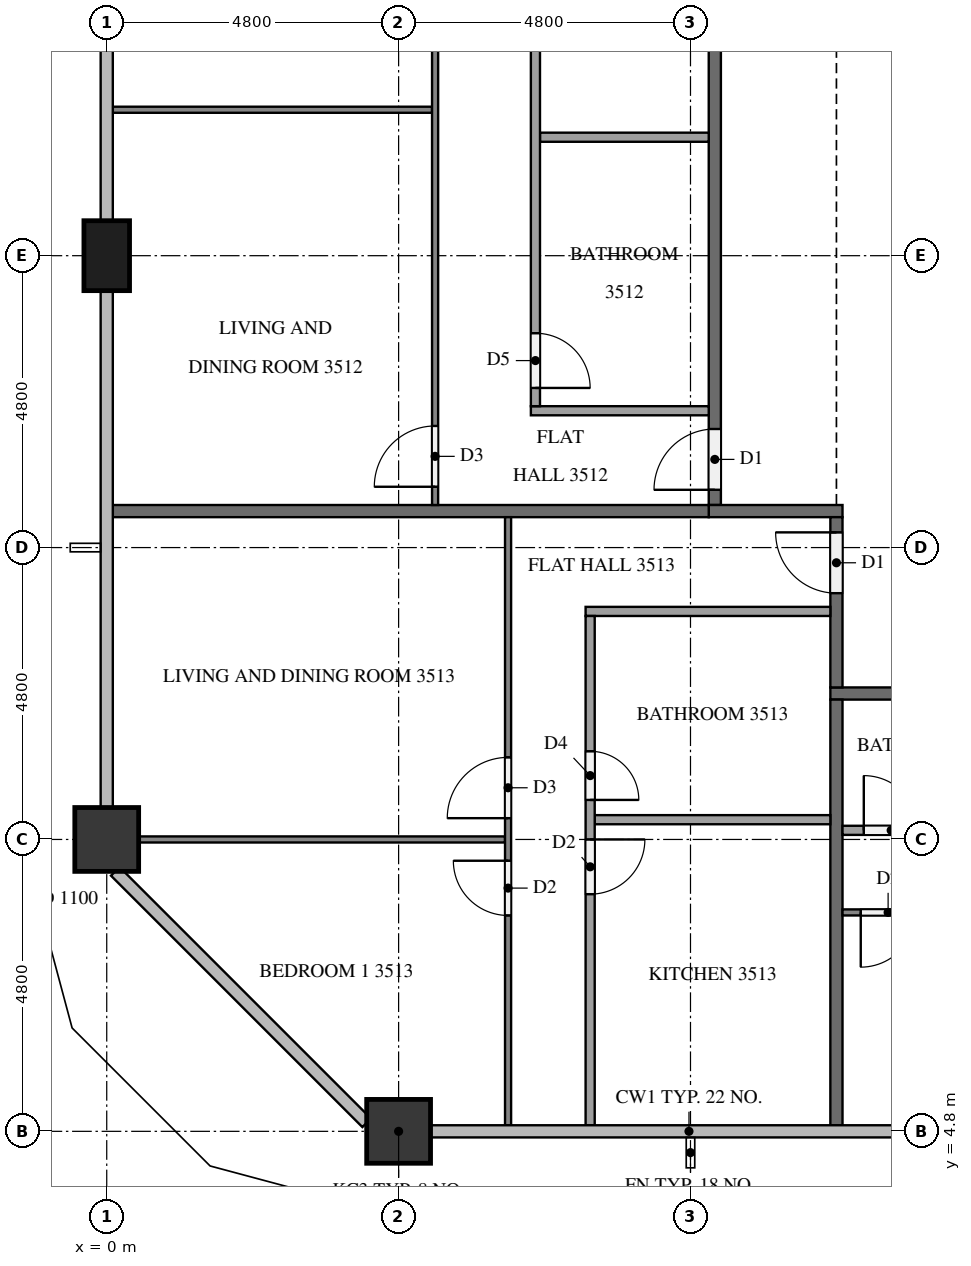
"""IFC4 building model, lengths in metres.
Left out: names, types, materials, properties, quantities, classifications, styles, units other than length and angle.
Written with IfcOpenShell. Run it as: python <this file> out.ifc"""

import sys

from ifc_helpers import new_model, si_unit, direction, frame, frame_2d, origin, origin_2d, place, context, subcontext, project, spatial, rectangle, extrude, element, fill, save


model = new_model("IFC4")
c1 = context("Model", 3, precision=1e-05, world=origin(), true_north=direction((0.0, 1.0)))
c2 = subcontext(c1, "Body", "Model", "MODEL_VIEW")
j1 = project(units=[si_unit("LENGTHUNIT", "METRE"), si_unit("PLANEANGLEUNIT", "RADIAN")], contexts=[c1])
p1 = place(None, origin())
s1 = spatial("IfcSite", under=j1, at=p1, CompositionType="ELEMENT")
p2 = place(p1, origin())
s2 = spatial("IfcBuilding", under=s1, at=p2, CompositionType="ELEMENT")
p3 = place(p2, frame((0.0, 0.0, 136.6)))
s3 = spatial("IfcBuildingStorey", under=s2, at=p3, CompositionType="ELEMENT", Elevation=136.6)
p4 = place(p3, frame((4.8, 4.8, 0.0), z_axis=(0.0, 0.0, 1.0), x_axis=(1.0, 0.0, 0.0)))
e1 = element("IfcColumn", 1, at=p4, inside=s3, PredefinedType="COLUMN", context=c2, shape_type="SweptSolid", body=[
    extrude(rectangle(XDim=1.05, YDim=1.05, at=origin_2d()), origin(), (0.0, 0.0, 1.0), 3.2),
])
p5 = place(p3, frame((0.0, 19.2, 0.0), z_axis=(0.0, 0.0, 1.0), x_axis=(0.0, 1.0, 0.0)))
e2 = element("IfcColumn", 2, at=p5, inside=s3, PredefinedType="COLUMN", context=c2, shape_type="SweptSolid", body=[
    extrude(rectangle(XDim=1.15, YDim=0.75, at=origin_2d()), origin(), (0.0, 0.0, 1.0), 3.2),
])
p6 = place(p3, frame((0.0, 9.6, 0.0), z_axis=(0.0, 0.0, 1.0), x_axis=(1.0, 0.0, 0.0)))
e3 = element("IfcColumn", 3, at=p6, inside=s3, PredefinedType="COLUMN", context=c2, shape_type="SweptSolid", body=[
    extrude(rectangle(XDim=1.05, YDim=1.05, at=origin_2d()), origin(), (0.0, 0.0, 1.0), 3.2),
])
p7 = place(p3, frame((50.5, 12.0, 0.0), z_axis=(0.0, 0.0, 1.0), x_axis=(-1.0, 0.0, 0.0)))
e4 = element("IfcWall", 4, at=p7, inside=s3, PredefinedType="PARTITIONING", context=c2, shape_type="SweptSolid", body=[
    extrude(rectangle(XDim=38.6, YDim=0.2, at=frame_2d((19.3, 0.0))), origin(), (0.0, 0.0, 1.0), 3.2),
])
p8 = place(p7, frame((24.45, 0.0, 0.0)))
e5 = element("IfcOpeningElement", 5, at=p8, cuts=e4, PredefinedType="OPENING", context=c2, shape_type="SweptSolid", body=[
    extrude(rectangle(XDim=1.0, YDim=2.1, at=frame_2d((0.5, 1.05))), frame((0.0, 0.11, 0.0), z_axis=(0.0, -1.0, 0.0), x_axis=(1.0, 0.0, 0.0)), (0.0, 0.0, 1.0), 0.22),
])
p9 = place(p7, frame((10.05, 0.0, 0.0)))
e6 = element("IfcOpeningElement", 6, at=p9, cuts=e4, PredefinedType="OPENING", context=c2, shape_type="SweptSolid", body=[
    extrude(rectangle(XDim=1.0, YDim=2.1, at=frame_2d((0.5, 1.05))), frame((0.0, 0.11, 0.0), z_axis=(0.0, -1.0, 0.0), x_axis=(1.0, 0.0, 0.0)), (0.0, 0.0, 1.0), 0.22),
])
p10 = place(p7, frame((8.35, 0.0, 0.0)))
e7 = element("IfcOpeningElement", 7, at=p10, cuts=e4, PredefinedType="OPENING", context=c2, shape_type="SweptSolid", body=[
    extrude(rectangle(XDim=1.0, YDim=2.1, at=frame_2d((0.5, 1.05))), frame((0.0, 0.11, 0.0), z_axis=(0.0, -1.0, 0.0), x_axis=(1.0, 0.0, 0.0)), (0.0, 0.0, 1.0), 0.22),
])
p11 = place(p3, frame((10.0, 15.1, 0.0), z_axis=(0.0, 0.0, 1.0), x_axis=(0.0, 1.0, 0.0)))
e8 = element("IfcWall", 8, at=p11, inside=s3, PredefinedType="PARTITIONING", context=c2, shape_type="SweptSolid", body=[
    extrude(rectangle(XDim=22.6, YDim=0.2, at=frame_2d((11.3, 0.0))), origin(), (0.0, 0.0, 1.0), 3.2),
])
p12 = place(p11, frame((16.45, 0.0, 0.0)))
e9 = element("IfcOpeningElement", 9, at=p12, cuts=e8, PredefinedType="OPENING", context=c2, shape_type="SweptSolid", body=[
    extrude(rectangle(XDim=1.0, YDim=2.1, at=frame_2d((0.5, 1.05))), frame((0.0, 0.11, 0.0), z_axis=(0.0, -1.0, 0.0), x_axis=(1.0, 0.0, 0.0)), (0.0, 0.0, 1.0), 0.22),
])
p13 = place(p11, frame((0.25, 0.0, 0.0)))
e10 = element("IfcOpeningElement", 10, at=p13, cuts=e8, PredefinedType="OPENING", context=c2, shape_type="SweptSolid", body=[
    extrude(rectangle(XDim=1.0, YDim=2.1, at=frame_2d((0.5, 1.05))), frame((0.0, 0.11, 0.0), z_axis=(0.0, -1.0, 0.0), x_axis=(1.0, 0.0, 0.0)), (0.0, 0.0, 1.0), 0.22),
])
p14 = place(p3, frame((9.9, 15.0, 0.0), z_axis=(0.0, 0.0, 1.0), x_axis=(1.0, 0.0, 0.0)))
e11 = element("IfcWall", 11, at=p14, inside=s3, PredefinedType="PARTITIONING", context=c2, shape_type="SweptSolid", body=[
    extrude(rectangle(XDim=2.2, YDim=0.2, at=frame_2d((1.1, 0.0))), origin(), (0.0, 0.0, 1.0), 3.2),
])
p15 = place(p3, frame((12.0, 12.1, 0.0), z_axis=(0.0, 0.0, 1.0), x_axis=(0.0, 1.0, 0.0)))
e12 = element("IfcWall", 12, at=p15, inside=s3, PredefinedType="PARTITIONING", context=c2, shape_type="SweptSolid", body=[
    extrude(rectangle(XDim=2.8, YDim=0.2, at=frame_2d((1.4, 0.0))), origin(), (0.0, 0.0, 1.0), 3.2),
])
p16 = place(p15, frame((1.55, 0.0, 0.0)))
e13 = element("IfcOpeningElement", 13, at=p16, cuts=e12, PredefinedType="OPENING", context=c2, shape_type="SweptSolid", body=[
    extrude(rectangle(XDim=1.0, YDim=2.1, at=frame_2d((0.5, 1.05))), frame((0.0, 0.11, 0.0), z_axis=(0.0, -1.0, 0.0), x_axis=(1.0, 0.0, 0.0)), (0.0, 0.0, 1.0), 0.22),
])
p17 = place(p3, frame((12.0, 4.9, 0.0), z_axis=(0.0, 0.0, 1.0), x_axis=(0.0, 1.0, 0.0)))
e14 = element("IfcWall", 14, at=p17, inside=s3, PredefinedType="PARTITIONING", context=c2, shape_type="SweptSolid", body=[
    extrude(rectangle(XDim=7.0, YDim=0.2, at=frame_2d((3.5, 0.0))), origin(), (0.0, 0.0, 1.0), 3.2),
])
p18 = place(p3, frame((0.1, 15.0, 0.0), z_axis=(0.0, 0.0, 1.0), x_axis=(1.0, 0.0, 0.0)))
e15 = element("IfcWall", 15, at=p18, inside=s3, PredefinedType="PARTITIONING", context=c2, shape_type="SweptSolid", body=[
    extrude(rectangle(XDim=9.8, YDim=0.2, at=frame_2d((4.9, 0.0))), origin(), (0.0, 0.0, 1.0), 3.2),
])
p19 = place(p3, frame((26.3, 8.4, 0.0), z_axis=(0.0, 0.0, 1.0), x_axis=(-1.0, 0.0, 0.0)))
e16 = element("IfcWall", 16, at=p19, inside=s3, PredefinedType="PARTITIONING", context=c2, shape_type="SweptSolid", body=[
    extrude(rectangle(XDim=14.2, YDim=0.1, at=frame_2d((7.1, 0.0))), origin(), (0.0, 0.0, 1.0), 3.2),
])
p20 = place(p19, frame((3.45, 0.0, 0.0)))
e17 = element("IfcOpeningElement", 17, at=p20, cuts=e16, PredefinedType="OPENING", context=c2, shape_type="SweptSolid", body=[
    extrude(rectangle(XDim=0.9, YDim=2.1, at=frame_2d((0.45, 1.05))), frame((0.0, 0.06, 0.0), z_axis=(0.0, -1.0, 0.0), x_axis=(1.0, 0.0, 0.0)), (0.0, 0.0, 1.0), 0.12),
])
p21 = place(p19, frame((5.05, 0.0, 0.0)))
e18 = element("IfcOpeningElement", 18, at=p21, cuts=e16, PredefinedType="OPENING", context=c2, shape_type="SweptSolid", body=[
    extrude(rectangle(XDim=1.0, YDim=2.1, at=frame_2d((0.5, 1.05))), frame((0.0, 0.06, 0.0), z_axis=(0.0, -1.0, 0.0), x_axis=(1.0, 0.0, 0.0)), (0.0, 0.0, 1.0), 0.12),
])
p22 = place(p19, frame((13.0, 0.0, 0.0)))
e19 = element("IfcOpeningElement", 19, at=p22, cuts=e16, PredefinedType="OPENING", context=c2, shape_type="SweptSolid", body=[
    extrude(rectangle(XDim=0.9, YDim=2.1, at=frame_2d((0.45, 1.05))), frame((0.0, 0.06, 0.0), z_axis=(0.0, -1.0, 0.0), x_axis=(1.0, 0.0, 0.0)), (0.0, 0.0, 1.0), 0.12),
])
p23 = place(p3, frame((12.1, 9.75, 0.0), z_axis=(0.0, 0.0, 1.0), x_axis=(1.0, 0.0, 0.0)))
e20 = element("IfcWall", 20, at=p23, inside=s3, PredefinedType="PARTITIONING", context=c2, shape_type="SweptSolid", body=[
    extrude(rectangle(XDim=12.575, YDim=0.15, at=frame_2d((6.288, 0.0))), origin(), (0.0, 0.0, 1.0), 3.2),
])
p24 = place(p23, frame((9.998, 0.0, 0.0)))
e21 = element("IfcOpeningElement", 21, at=p24, cuts=e20, PredefinedType="OPENING", context=c2, shape_type="SweptSolid", body=[
    extrude(rectangle(XDim=0.8, YDim=2.1, at=frame_2d((0.4, 1.05))), frame((0.0, 0.085, 0.0), z_axis=(0.0, -1.0, 0.0), x_axis=(1.0, 0.0, 0.0)), (0.0, 0.0, 1.0), 0.17),
])
p25 = place(p23, frame((8.448, 0.0, 0.0)))
e22 = element("IfcOpeningElement", 22, at=p25, cuts=e20, PredefinedType="OPENING", context=c2, shape_type="SweptSolid", body=[
    extrude(rectangle(XDim=0.9, YDim=2.1, at=frame_2d((0.45, 1.05))), frame((0.0, 0.085, 0.0), z_axis=(0.0, -1.0, 0.0), x_axis=(1.0, 0.0, 0.0)), (0.0, 0.0, 1.0), 0.17),
])
p26 = place(p23, frame((0.35, 0.0, 0.0)))
e23 = element("IfcOpeningElement", 23, at=p26, cuts=e20, PredefinedType="OPENING", context=c2, shape_type="SweptSolid", body=[
    extrude(rectangle(XDim=0.9, YDim=2.1, at=frame_2d((0.45, 1.05))), frame((0.0, 0.085, 0.0), z_axis=(0.0, -1.0, 0.0), x_axis=(1.0, 0.0, 0.0)), (0.0, 0.0, 1.0), 0.17),
])
p27 = place(p3, frame((5.35, 21.6, 0.0), z_axis=(0.0, 0.0, 1.0), x_axis=(-1.0, 0.0, 0.0)))
e24 = element("IfcWall", 24, at=p27, inside=s3, PredefinedType="PARTITIONING", context=c2, shape_type="SweptSolid", body=[
    extrude(rectangle(XDim=5.25, YDim=0.1, at=frame_2d((2.625, 0.0))), origin(), (0.0, 0.0, 1.0), 3.2),
])
p28 = place(p3, frame((5.4, 15.1, 0.0), z_axis=(0.0, 0.0, 1.0), x_axis=(0.0, 1.0, 0.0)))
e25 = element("IfcWall", 25, at=p28, inside=s3, PredefinedType="PARTITIONING", context=c2, shape_type="SweptSolid", body=[
    extrude(rectangle(XDim=16.0, YDim=0.1, at=frame_2d((8.0, 0.0))), origin(), (0.0, 0.0, 1.0), 3.2),
])
p29 = place(p28, frame((0.3, 0.0, 0.0)))
e26 = element("IfcOpeningElement", 26, at=p29, cuts=e25, PredefinedType="OPENING", context=c2, shape_type="SweptSolid", body=[
    extrude(rectangle(XDim=1.0, YDim=2.1, at=frame_2d((0.5, 1.05))), frame((0.0, 0.06, 0.0), z_axis=(0.0, -1.0, 0.0), x_axis=(1.0, 0.0, 0.0)), (0.0, 0.0, 1.0), 0.12),
])
p30 = place(p28, frame((10.05, 0.0, 0.0)))
e27 = element("IfcOpeningElement", 27, at=p30, cuts=e25, PredefinedType="OPENING", context=c2, shape_type="SweptSolid", body=[
    extrude(rectangle(XDim=0.9, YDim=2.1, at=frame_2d((0.45, 1.05))), frame((0.0, 0.06, 0.0), z_axis=(0.0, -1.0, 0.0), x_axis=(1.0, 0.0, 0.0)), (0.0, 0.0, 1.0), 0.12),
])
p31 = place(p28, frame((11.65, 0.0, 0.0)))
e28 = element("IfcOpeningElement", 28, at=p31, cuts=e25, PredefinedType="OPENING", context=c2, shape_type="SweptSolid", body=[
    extrude(rectangle(XDim=0.9, YDim=2.1, at=frame_2d((0.45, 1.05))), frame((0.0, 0.06, 0.0), z_axis=(0.0, -1.0, 0.0), x_axis=(1.0, 0.0, 0.0)), (0.0, 0.0, 1.0), 0.12),
])
p32 = place(p3, frame((9.9, 21.148, 0.0), z_axis=(0.0, 0.0, 1.0), x_axis=(-1.0, 0.0, 0.0)))
e29 = element("IfcWall", 29, at=p32, inside=s3, PredefinedType="PARTITIONING", context=c2, shape_type="SweptSolid", body=[
    extrude(rectangle(XDim=2.775, YDim=0.15, at=frame_2d((1.387, 0.0))), origin(), (0.0, 0.0, 1.0), 3.2),
])
p33 = place(p3, frame((9.9, 16.65, 0.0), z_axis=(0.0, 0.0, 1.0), x_axis=(-1.0, 0.0, 0.0)))
e30 = element("IfcWall", 30, at=p33, inside=s3, PredefinedType="PARTITIONING", context=c2, shape_type="SweptSolid", body=[
    extrude(rectangle(XDim=2.925, YDim=0.15, at=frame_2d((1.462, 0.0))), origin(), (0.0, 0.0, 1.0), 3.2),
])
p34 = place(p3, frame((7.05, 31.1, 0.0), z_axis=(0.0, 0.0, 1.0), x_axis=(0.0, -1.0, 0.0)))
e31 = element("IfcWall", 31, at=p34, inside=s3, PredefinedType="PARTITIONING", context=c2, shape_type="SweptSolid", body=[
    extrude(rectangle(XDim=14.375, YDim=0.15, at=frame_2d((7.188, 0.0))), origin(), (0.0, 0.0, 1.0), 3.2),
])
p35 = place(p34, frame((13.175, 0.0, 0.0)))
e32 = element("IfcOpeningElement", 32, at=p35, cuts=e31, PredefinedType="OPENING", context=c2, shape_type="SweptSolid", body=[
    extrude(rectangle(XDim=0.9, YDim=2.1, at=frame_2d((0.45, 1.05))), frame((0.0, 0.085, 0.0), z_axis=(0.0, -1.0, 0.0), x_axis=(1.0, 0.0, 0.0)), (0.0, 0.0, 1.0), 0.17),
])
p36 = place(p34, frame((3.642, 0.0, 0.0)))
e33 = element("IfcOpeningElement", 33, at=p36, cuts=e31, PredefinedType="OPENING", context=c2, shape_type="SweptSolid", body=[
    extrude(rectangle(XDim=0.9, YDim=2.1, at=frame_2d((0.45, 1.05))), frame((0.0, 0.085, 0.0), z_axis=(0.0, -1.0, 0.0), x_axis=(1.0, 0.0, 0.0)), (0.0, 0.0, 1.0), 0.17),
])
p37 = place(p34, frame((2.192, 0.0, 0.0)))
e34 = element("IfcOpeningElement", 34, at=p37, cuts=e31, PredefinedType="OPENING", context=c2, shape_type="SweptSolid", body=[
    extrude(rectangle(XDim=0.8, YDim=2.1, at=frame_2d((0.4, 1.05))), frame((0.0, 0.085, 0.0), z_axis=(0.0, -1.0, 0.0), x_axis=(1.0, 0.0, 0.0)), (0.0, 0.0, 1.0), 0.17),
])
p38 = place(p3, frame((6.55, 9.6, 0.0), z_axis=(0.0, 0.0, 1.0), x_axis=(-1.0, 0.0, 0.0)))
e35 = element("IfcWall", 35, at=p38, inside=s3, PredefinedType="PARTITIONING", context=c2, shape_type="SweptSolid", body=[
    extrude(rectangle(XDim=6.025, YDim=0.1, at=frame_2d((3.013, 0.0))), origin(), (0.0, 0.0, 1.0), 3.2),
])
p39 = place(p3, frame((6.6, 4.9, 0.0), z_axis=(0.0, 0.0, 1.0), x_axis=(0.0, 1.0, 0.0)))
e36 = element("IfcWall", 36, at=p39, inside=s3, PredefinedType="PARTITIONING", context=c2, shape_type="SweptSolid", body=[
    extrude(rectangle(XDim=10.0, YDim=0.1, at=frame_2d((5.0, 0.0))), origin(), (0.0, 0.0, 1.0), 3.2),
])
p40 = place(p39, frame((5.05, 0.0, 0.0)))
e37 = element("IfcOpeningElement", 37, at=p40, cuts=e36, PredefinedType="OPENING", context=c2, shape_type="SweptSolid", body=[
    extrude(rectangle(XDim=1.0, YDim=2.1, at=frame_2d((0.5, 1.05))), frame((0.0, 0.06, 0.0), z_axis=(0.0, -1.0, 0.0), x_axis=(1.0, 0.0, 0.0)), (0.0, 0.0, 1.0), 0.12),
])
p41 = place(p39, frame((3.45, 0.0, 0.0)))
e38 = element("IfcOpeningElement", 38, at=p41, cuts=e36, PredefinedType="OPENING", context=c2, shape_type="SweptSolid", body=[
    extrude(rectangle(XDim=0.9, YDim=2.1, at=frame_2d((0.45, 1.05))), frame((0.0, 0.06, 0.0), z_axis=(0.0, -1.0, 0.0), x_axis=(1.0, 0.0, 0.0)), (0.0, 0.0, 1.0), 0.12),
])
p42 = place(p3, frame((11.9, 9.925, 0.0), z_axis=(0.0, 0.0, 1.0), x_axis=(-1.0, 0.0, 0.0)))
e39 = element("IfcWall", 39, at=p42, inside=s3, PredefinedType="PARTITIONING", context=c2, shape_type="SweptSolid", body=[
    extrude(rectangle(XDim=3.875, YDim=0.15, at=frame_2d((1.938, 0.0))), origin(), (0.0, 0.0, 1.0), 3.2),
])
p43 = place(p3, frame((11.9, 13.35, 0.0), z_axis=(0.0, 0.0, 1.0), x_axis=(-1.0, 0.0, 0.0)))
e40 = element("IfcWall", 40, at=p43, inside=s3, PredefinedType="PARTITIONING", context=c2, shape_type="SweptSolid", body=[
    extrude(rectangle(XDim=4.025, YDim=0.15, at=frame_2d((2.012, 0.0))), origin(), (0.0, 0.0, 1.0), 3.2),
])
p44 = place(p3, frame((7.95, 13.275, 0.0), z_axis=(0.0, 0.0, 1.0), x_axis=(0.0, -1.0, 0.0)))
e41 = element("IfcWall", 41, at=p44, inside=s3, PredefinedType="PARTITIONING", context=c2, shape_type="SweptSolid", body=[
    extrude(rectangle(XDim=8.375, YDim=0.15, at=frame_2d((4.188, 0.0))), origin(), (0.0, 0.0, 1.0), 3.2),
])
p45 = place(p44, frame((2.225, 0.0, 0.0)))
e42 = element("IfcOpeningElement", 42, at=p45, cuts=e41, PredefinedType="OPENING", context=c2, shape_type="SweptSolid", body=[
    extrude(rectangle(XDim=0.8, YDim=2.1, at=frame_2d((0.4, 1.05))), frame((0.0, 0.085, 0.0), z_axis=(0.0, -1.0, 0.0), x_axis=(1.0, 0.0, 0.0)), (0.0, 0.0, 1.0), 0.17),
])
p46 = place(p44, frame((3.675, 0.0, 0.0)))
e43 = element("IfcOpeningElement", 43, at=p46, cuts=e41, PredefinedType="OPENING", context=c2, shape_type="SweptSolid", body=[
    extrude(rectangle(XDim=0.9, YDim=2.1, at=frame_2d((0.45, 1.05))), frame((0.0, 0.085, 0.0), z_axis=(0.0, -1.0, 0.0), x_axis=(1.0, 0.0, 0.0)), (0.0, 0.0, 1.0), 0.17),
])
p47 = place(p13, origin())
e44 = element("IfcDoor", 44, at=p47, inside=s3, OperationType="SINGLE_SWING_LEFT", PredefinedType="DOOR", context=c2, shape_type="SweptSolid", body=[
    extrude(rectangle(XDim=1.0, YDim=2.1, at=frame_2d((0.5, 1.05))), frame((0.0, 0.025, 0.0), z_axis=(0.0, -1.0, 0.0), x_axis=(1.0, 0.0, 0.0)), (0.0, 0.0, 1.0), 0.05),
])
fill(e10, e44)
p48 = place(p16, origin())
e45 = element("IfcDoor", 45, at=p48, inside=s3, OperationType="SINGLE_SWING_RIGHT", PredefinedType="DOOR", context=c2, shape_type="SweptSolid", body=[
    extrude(rectangle(XDim=1.0, YDim=2.1, at=frame_2d((0.5, 1.05))), frame((0.0, 0.025, 0.0), z_axis=(0.0, -1.0, 0.0), x_axis=(1.0, 0.0, 0.0)), (0.0, 0.0, 1.0), 0.05),
])
fill(e13, e45)
p49 = place(p22, origin())
e46 = element("IfcDoor", 46, at=p49, inside=s3, OperationType="SINGLE_SWING_RIGHT", PredefinedType="DOOR", context=c2, shape_type="SweptSolid", body=[
    extrude(rectangle(XDim=0.9, YDim=2.1, at=frame_2d((0.45, 1.05))), frame((0.0, 0.025, 0.0), z_axis=(0.0, -1.0, 0.0), x_axis=(1.0, 0.0, 0.0)), (0.0, 0.0, 1.0), 0.05),
])
fill(e19, e46)
p50 = place(p26, origin())
e47 = element("IfcDoor", 47, at=p50, inside=s3, OperationType="SINGLE_SWING_LEFT", PredefinedType="DOOR", context=c2, shape_type="SweptSolid", body=[
    extrude(rectangle(XDim=0.9, YDim=2.1, at=frame_2d((0.45, 1.05))), frame((0.0, 0.025, 0.0), z_axis=(0.0, -1.0, 0.0), x_axis=(1.0, 0.0, 0.0)), (0.0, 0.0, 1.0), 0.05),
])
fill(e23, e47)
p51 = place(p29, origin())
e48 = element("IfcDoor", 48, at=p51, inside=s3, OperationType="SINGLE_SWING_LEFT", PredefinedType="DOOR", context=c2, shape_type="SweptSolid", body=[
    extrude(rectangle(XDim=1.0, YDim=2.1, at=frame_2d((0.5, 1.05))), frame((0.0, 0.025, 0.0), z_axis=(0.0, -1.0, 0.0), x_axis=(1.0, 0.0, 0.0)), (0.0, 0.0, 1.0), 0.05),
])
fill(e26, e48)
p52 = place(p35, origin())
e49 = element("IfcDoor", 49, at=p52, inside=s3, OperationType="SINGLE_SWING_RIGHT", PredefinedType="DOOR", context=c2, shape_type="SweptSolid", body=[
    extrude(rectangle(XDim=0.9, YDim=2.1, at=frame_2d((0.45, 1.05))), frame((0.0, 0.025, 0.0), z_axis=(0.0, -1.0, 0.0), x_axis=(1.0, 0.0, 0.0)), (0.0, 0.0, 1.0), 0.05),
])
fill(e32, e49)
p53 = place(p40, origin())
e50 = element("IfcDoor", 50, at=p53, inside=s3, OperationType="SINGLE_SWING_LEFT", PredefinedType="DOOR", context=c2, shape_type="SweptSolid", body=[
    extrude(rectangle(XDim=1.0, YDim=2.1, at=frame_2d((0.5, 1.05))), frame((0.0, 0.025, 0.0), z_axis=(0.0, -1.0, 0.0), x_axis=(1.0, 0.0, 0.0)), (0.0, 0.0, 1.0), 0.05),
])
fill(e37, e50)
p54 = place(p41, origin())
e51 = element("IfcDoor", 51, at=p54, inside=s3, OperationType="SINGLE_SWING_RIGHT", PredefinedType="DOOR", context=c2, shape_type="SweptSolid", body=[
    extrude(rectangle(XDim=0.9, YDim=2.1, at=frame_2d((0.45, 1.05))), frame((0.0, 0.025, 0.0), z_axis=(0.0, -1.0, 0.0), x_axis=(1.0, 0.0, 0.0)), (0.0, 0.0, 1.0), 0.05),
])
fill(e38, e51)
p55 = place(p45, origin())
e52 = element("IfcDoor", 52, at=p55, inside=s3, OperationType="SINGLE_SWING_RIGHT", PredefinedType="DOOR", context=c2, shape_type="SweptSolid", body=[
    extrude(rectangle(XDim=0.8, YDim=2.1, at=frame_2d((0.4, 1.05))), frame((0.0, 0.025, 0.0), z_axis=(0.0, -1.0, 0.0), x_axis=(1.0, 0.0, 0.0)), (0.0, 0.0, 1.0), 0.05),
])
fill(e42, e52)
p56 = place(p46, origin())
e53 = element("IfcDoor", 53, at=p56, inside=s3, OperationType="SINGLE_SWING_LEFT", PredefinedType="DOOR", context=c2, shape_type="SweptSolid", body=[
    extrude(rectangle(XDim=0.9, YDim=2.1, at=frame_2d((0.45, 1.05))), frame((0.0, 0.025, 0.0), z_axis=(0.0, -1.0, 0.0), x_axis=(1.0, 0.0, 0.0)), (0.0, 0.0, 1.0), 0.05),
])
fill(e43, e53)
save(model, sys.argv[1])
